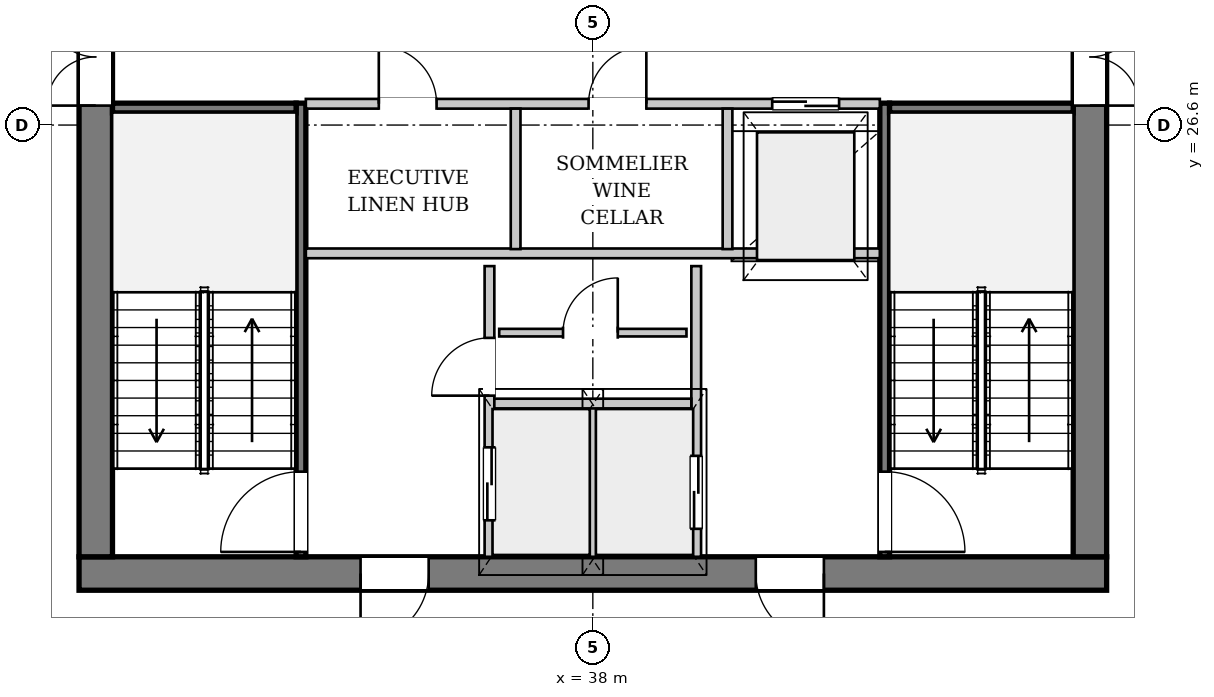
"""IFC4 building model, lengths in metres.
Left out: names, types, materials, properties, quantities, classifications, styles, units other than length and angle.
Written with IfcOpenShell. Run it as: python <this file> out.ifc"""

import sys

from ifc_helpers import new_model, si_unit, direction, frame, frame_2d, origin, place, context, subcontext, project, spatial, rectangle, extrude, source, transform, mapped, element, fill, save


model = new_model("IFC4")
c1 = context("Model", 3, precision=1e-05, world=origin(), true_north=direction((0.0, 1.0)))
c2 = subcontext(c1, "Body", "Model", "MODEL_VIEW")
j1 = project(units=[si_unit("LENGTHUNIT", "METRE"), si_unit("PLANEANGLEUNIT", "RADIAN")], contexts=[c1])
p1 = place(None, origin())
s1 = spatial("IfcSite", under=j1, at=p1, CompositionType="ELEMENT")
p2 = place(p1, origin())
s2 = spatial("IfcBuilding", under=s1, at=p2, CompositionType="ELEMENT")
p3 = place(p2, frame((0.0, 0.0, 160.8)))
s3 = spatial("IfcBuildingStorey", under=s2, at=p3, CompositionType="ELEMENT", Elevation=160.8)
p4 = place(p3, frame((52.91, 19.645, 0.0), z_axis=(0.0, 0.0, 1.0), x_axis=(-0.683193045934, -0.730237811941, 0.0)))
e1 = element("IfcWall", 1, at=p4, inside=s3, PredefinedType="SOLIDWALL", context=c2, shape_type="SweptSolid", body=[
    extrude(rectangle(XDim=23.503, YDim=0.32, at=frame_2d((11.752, 0.0))), origin(), (0.0, 0.0, 1.0), 2.722),
])
p5 = place(p4, frame((6.771, 0.0, 0.0)))
e2 = element("IfcOpeningElement", 2, at=p5, cuts=e1, PredefinedType="OPENING", context=c2, shape_type="SweptSolid", body=[
    extrude(rectangle(XDim=1.5, YDim=2.3, at=frame_2d((0.75, 1.15))), frame((0.0, 0.17, 0.0), z_axis=(0.0, -1.0, 0.0), x_axis=(1.0, 0.0, 0.0)), (0.0, 0.0, 1.0), 0.34),
])
p6 = place(p4, frame((16.093, 0.0, 0.252)))
e3 = element("IfcOpeningElement", 3, at=p6, cuts=e1, PredefinedType="OPENING", context=c2, shape_type="SweptSolid", body=[
    extrude(rectangle(XDim=2.6, YDim=2.35, at=frame_2d((1.3, 1.175))), frame((0.0, 0.17, 0.0), z_axis=(0.0, -1.0, 0.0), x_axis=(1.0, 0.0, 0.0)), (0.0, 0.0, 1.0), 0.34),
])
p7 = place(p3, frame((46.45, 19.225, 0.0), z_axis=(0.0, 0.0, 1.0), x_axis=(-1.0, 0.0, 0.0)))
e4 = element("IfcWall", 4, at=p7, inside=s3, PredefinedType="SHEAR", context=c2, shape_type="SweptSolid", body=[
    extrude(rectangle(XDim=16.9, YDim=0.55, at=frame_2d((8.45, 0.0))), origin(), (0.0, 0.0, 1.0), 3.33),
])
p8 = place(p7, frame((4.65, 0.0, 0.0)))
e5 = element("IfcOpeningElement", 5, at=p8, cuts=e4, PredefinedType="OPENING", context=c2, shape_type="SweptSolid", body=[
    extrude(rectangle(XDim=1.12, YDim=2.25, at=frame_2d((0.56, 1.125))), frame((0.0, 0.285, 0.0), z_axis=(0.0, -1.0, 0.0), x_axis=(1.0, 0.0, 0.0)), (0.0, 0.0, 1.0), 0.57),
])
p9 = place(p7, frame((11.15, 0.0, 0.0)))
e6 = element("IfcOpeningElement", 6, at=p9, cuts=e4, PredefinedType="OPENING", context=c2, shape_type="SweptSolid", body=[
    extrude(rectangle(XDim=1.12, YDim=2.25, at=frame_2d((0.56, 1.125))), frame((0.0, 0.285, 0.0), z_axis=(0.0, -1.0, 0.0), x_axis=(1.0, 0.0, 0.0)), (0.0, 0.0, 1.0), 0.57),
])
p10 = place(p3, frame((29.825, 19.5, 0.0), z_axis=(0.0, 0.0, 1.0), x_axis=(0.0, 1.0, 0.0)))
e7 = element("IfcWall", 7, at=p10, inside=s3, PredefinedType="SHEAR", context=c2, shape_type="SweptSolid", body=[
    extrude(rectangle(XDim=14.2, YDim=0.55, at=frame_2d((7.1, 0.0))), origin(), (0.0, 0.0, 1.0), 3.33),
])
p11 = place(p10, frame((7.42, 0.0, 0.0)))
e8 = element("IfcOpeningElement", 8, at=p11, cuts=e7, PredefinedType="OPENING", context=c2, shape_type="SweptSolid", body=[
    extrude(rectangle(XDim=1.6, YDim=2.2, at=frame_2d((0.8, 1.1))), frame((0.0, 0.285, 0.0), z_axis=(0.0, -1.0, 0.0), x_axis=(1.0, 0.0, 0.0)), (0.0, 0.0, 1.0), 0.57),
])
p12 = place(p3, frame((46.175, 33.7, 0.0), z_axis=(0.0, 0.0, 1.0), x_axis=(0.0, -1.0, 0.0)))
e9 = element("IfcWall", 9, at=p12, inside=s3, PredefinedType="SHEAR", context=c2, shape_type="SweptSolid", body=[
    extrude(rectangle(XDim=14.2, YDim=0.55, at=frame_2d((7.1, 0.0))), origin(), (0.0, 0.0, 1.0), 3.33),
])
p13 = place(p12, frame((5.18, 0.0, 0.0)))
e10 = element("IfcOpeningElement", 10, at=p13, cuts=e9, PredefinedType="OPENING", context=c2, shape_type="SweptSolid", body=[
    extrude(rectangle(XDim=1.6, YDim=2.2, at=frame_2d((0.8, 1.1))), frame((0.0, 0.285, 0.0), z_axis=(0.0, -1.0, 0.0), x_axis=(1.0, 0.0, 0.0)), (0.0, 0.0, 1.0), 0.57),
])
p14 = place(p12, frame((2.05, 0.0, 0.0)))
e11 = element("IfcOpeningElement", 11, at=p14, cuts=e9, PredefinedType="OPENING", context=c2, shape_type="SweptSolid", body=[
    extrude(rectangle(XDim=0.95, YDim=2.1, at=frame_2d((0.475, 1.05))), frame((0.0, 0.285, 0.0), z_axis=(0.0, -1.0, 0.0), x_axis=(1.0, 0.0, 0.0)), (0.0, 0.0, 1.0), 0.57),
])
p15 = place(p3, frame((33.2, 19.5, 0.0), z_axis=(0.0, 0.0, 1.0), x_axis=(0.0, 1.0, 0.0)))
e12 = element("IfcWall", 12, at=p15, inside=s3, PredefinedType="PARTITIONING", context=c2, shape_type="SweptSolid", body=[
    extrude(rectangle(XDim=7.46, YDim=0.16, at=frame_2d((3.73, 0.0))), origin(), (0.0, 0.0, 1.0), 3.33),
])
p16 = place(p15, frame((0.08, 0.0, 0.0)))
e13 = element("IfcOpeningElement", 13, at=p16, cuts=e12, PredefinedType="OPENING", context=c2, shape_type="SweptSolid", body=[
    extrude(rectangle(XDim=1.32, YDim=2.2, at=frame_2d((0.66, 1.1))), frame((0.0, 0.09, 0.0), z_axis=(0.0, -1.0, 0.0), x_axis=(1.0, 0.0, 0.0)), (0.0, 0.0, 1.0), 0.18),
])
p17 = place(p3, frame((30.1, 26.88, 0.0), z_axis=(0.0, 0.0, 1.0), x_axis=(1.0, 0.0, 0.0)))
e14 = element("IfcWall", 14, at=p17, inside=s3, PredefinedType="PARTITIONING", context=c2, shape_type="SweptSolid", body=[
    extrude(rectangle(XDim=3.02, YDim=0.16, at=frame_2d((1.51, 0.0))), origin(), (0.0, 0.0, 1.0), 3.33),
])
p18 = place(p3, frame((42.8, 26.96, 0.0), z_axis=(0.0, 0.0, 1.0), x_axis=(0.0, -1.0, 0.0)))
e15 = element("IfcWall", 15, at=p18, inside=s3, PredefinedType="PARTITIONING", context=c2, shape_type="SweptSolid", body=[
    extrude(rectangle(XDim=7.46, YDim=0.16, at=frame_2d((3.73, 0.0))), origin(), (0.0, 0.0, 1.0), 3.33),
])
p19 = place(p18, frame((6.06, 0.0, 0.0)))
e16 = element("IfcOpeningElement", 16, at=p19, cuts=e15, PredefinedType="OPENING", context=c2, shape_type="SweptSolid", body=[
    extrude(rectangle(XDim=1.32, YDim=2.2, at=frame_2d((0.66, 1.1))), frame((0.0, 0.09, 0.0), z_axis=(0.0, -1.0, 0.0), x_axis=(1.0, 0.0, 0.0)), (0.0, 0.0, 1.0), 0.18),
])
p20 = place(p3, frame((42.88, 26.88, 0.0), z_axis=(0.0, 0.0, 1.0), x_axis=(1.0, 0.0, 0.0)))
e17 = element("IfcWall", 17, at=p20, inside=s3, PredefinedType="PARTITIONING", context=c2, shape_type="SweptSolid", body=[
    extrude(rectangle(XDim=3.02, YDim=0.16, at=frame_2d((1.51, 0.0))), origin(), (0.0, 0.0, 1.0), 3.33),
])
p21 = place(p3, frame((36.3, 19.5, 0.0), z_axis=(0.0, 0.0, 1.0), x_axis=(0.0, 1.0, 0.0)))
e18 = element("IfcWall", 18, at=p21, inside=s3, PredefinedType="PARTITIONING", context=c2, shape_type="SweptSolid", body=[
    extrude(rectangle(XDim=4.78, YDim=0.16, at=frame_2d((2.39, 0.0))), origin(), (0.0, 0.0, 1.0), 3.33),
])
p22 = place(p21, frame((0.6, 0.0, 0.0)))
e19 = element("IfcOpeningElement", 19, at=p22, cuts=e18, PredefinedType="OPENING", context=c2, shape_type="SweptSolid", body=[
    extrude(rectangle(XDim=1.2, YDim=2.2, at=frame_2d((0.6, 1.1))), frame((0.0, 0.09, 0.0), z_axis=(0.0, -1.0, 0.0), x_axis=(1.0, 0.0, 0.0)), (0.0, 0.0, 1.0), 0.18),
])
p23 = place(p21, frame((2.65, 0.0, 0.0)))
e20 = element("IfcOpeningElement", 20, at=p23, cuts=e18, PredefinedType="OPENING", context=c2, shape_type="SweptSolid", body=[
    extrude(rectangle(XDim=0.95, YDim=2.1, at=frame_2d((0.475, 1.05))), frame((0.0, 0.09, 0.0), z_axis=(0.0, -1.0, 0.0), x_axis=(1.0, 0.0, 0.0)), (0.0, 0.0, 1.0), 0.18),
])
p24 = place(p3, frame((39.7, 24.28, 0.0), z_axis=(0.0, 0.0, 1.0), x_axis=(0.0, -1.0, 0.0)))
e21 = element("IfcWall", 21, at=p24, inside=s3, PredefinedType="PARTITIONING", context=c2, shape_type="SweptSolid", body=[
    extrude(rectangle(XDim=4.78, YDim=0.16, at=frame_2d((2.39, 0.0))), origin(), (0.0, 0.0, 1.0), 3.33),
])
p25 = place(p24, frame((3.12, 0.0, 0.0)))
e22 = element("IfcOpeningElement", 22, at=p25, cuts=e21, PredefinedType="OPENING", context=c2, shape_type="SweptSolid", body=[
    extrude(rectangle(XDim=1.2, YDim=2.2, at=frame_2d((0.6, 1.1))), frame((0.0, 0.09, 0.0), z_axis=(0.0, -1.0, 0.0), x_axis=(1.0, 0.0, 0.0)), (0.0, 0.0, 1.0), 0.18),
])
p26 = place(p3, frame((38.0, 19.5, 0.0), z_axis=(0.0, 0.0, 1.0), x_axis=(0.0, 1.0, 0.0)))
e23 = element("IfcWall", 23, at=p26, inside=s3, PredefinedType="PARTITIONING", context=c2, shape_type="SweptSolid", body=[
    extrude(rectangle(XDim=2.46, YDim=0.125, at=frame_2d((1.23, 0.0))), origin(), (0.0, 0.0, 1.0), 3.33),
])
p27 = place(p3, frame((36.38, 22.02, 0.0), z_axis=(0.0, 0.0, 1.0), x_axis=(1.0, 0.0, 0.0)))
e24 = element("IfcWall", 24, at=p27, inside=s3, PredefinedType="PARTITIONING", context=c2, shape_type="SweptSolid", body=[
    extrude(rectangle(XDim=3.24, YDim=0.16, at=frame_2d((1.62, 0.0))), origin(), (0.0, 0.0, 1.0), 3.33),
])
p28 = place(p3, frame((33.28, 24.49, 0.0), z_axis=(0.0, 0.0, 1.0), x_axis=(1.0, 0.0, 0.0)))
e25 = element("IfcWall", 25, at=p28, inside=s3, PredefinedType="PARTITIONING", context=c2, shape_type="SweptSolid", body=[
    extrude(rectangle(XDim=9.44, YDim=0.16, at=frame_2d((4.72, 0.0))), origin(), (0.0, 0.0, 1.0), 3.33),
])
p29 = place(p3, frame((36.46, 23.186, 0.0), z_axis=(0.0, 0.0, 1.0), x_axis=(1.0, 0.0, 0.0)))
e26 = element("IfcWall", 26, at=p29, inside=s3, PredefinedType="PARTITIONING", context=c2, shape_type="SweptSolid", body=[
    extrude(rectangle(XDim=3.08, YDim=0.125, at=frame_2d((1.54, 0.0))), origin(), (0.0, 0.0, 1.0), 3.33),
])
p30 = place(p29, frame((1.05, 0.0, 0.0)))
e27 = element("IfcOpeningElement", 27, at=p30, cuts=e26, PredefinedType="OPENING", context=c2, shape_type="SweptSolid", body=[
    extrude(rectangle(XDim=0.9, YDim=2.1, at=frame_2d((0.45, 1.05))), frame((0.0, 0.073, 0.0), z_axis=(0.0, -1.0, 0.0), x_axis=(1.0, 0.0, 0.0)), (0.0, 0.0, 1.0), 0.145),
])
p31 = place(p3, frame((33.28, 26.95, 0.0), z_axis=(0.0, 0.0, 1.0), x_axis=(1.0, 0.0, 0.0)))
e28 = element("IfcWall", 28, at=p31, inside=s3, PredefinedType="PARTITIONING", context=c2, shape_type="SweptSolid", body=[
    extrude(rectangle(XDim=9.44, YDim=0.16, at=frame_2d((4.72, 0.0))), origin(), (0.0, 0.0, 1.0), 3.33),
])
p32 = place(p31, frame((1.2, 0.0, 0.0)))
e29 = element("IfcOpeningElement", 29, at=p32, cuts=e28, PredefinedType="OPENING", context=c2, shape_type="SweptSolid", body=[
    extrude(rectangle(XDim=0.95, YDim=2.1, at=frame_2d((0.475, 1.05))), frame((0.0, 0.09, 0.0), z_axis=(0.0, -1.0, 0.0), x_axis=(1.0, 0.0, 0.0)), (0.0, 0.0, 1.0), 0.18),
])
p33 = place(p31, frame((4.65, 0.0, 0.0)))
e30 = element("IfcOpeningElement", 30, at=p33, cuts=e28, PredefinedType="OPENING", context=c2, shape_type="SweptSolid", body=[
    extrude(rectangle(XDim=0.95, YDim=2.1, at=frame_2d((0.475, 1.05))), frame((0.0, 0.09, 0.0), z_axis=(0.0, -1.0, 0.0), x_axis=(1.0, 0.0, 0.0)), (0.0, 0.0, 1.0), 0.18),
])
p34 = place(p31, frame((7.67, 0.0, 0.0)))
e31 = element("IfcOpeningElement", 31, at=p34, cuts=e28, PredefinedType="OPENING", context=c2, shape_type="SweptSolid", body=[
    extrude(rectangle(XDim=1.1, YDim=2.2, at=frame_2d((0.55, 1.1))), frame((0.0, 0.09, 0.0), z_axis=(0.0, -1.0, 0.0), x_axis=(1.0, 0.0, 0.0)), (0.0, 0.0, 1.0), 0.18),
])
for number, where, z_axis, x_axis in (
    (32, (36.73, 24.56, 0.0), (0.0, 0.0, 1.0), (0.0, 1.0, 0.0)),
    (33, (40.215, 24.56, 0.0), (0.0, 0.0, 1.0), (0.0, 1.0, 0.0)),
):
    element("IfcWall", number, at=place(p3, frame(where, z_axis=z_axis, x_axis=x_axis)), inside=s3, PredefinedType="PARTITIONING", context=c2, shape_type="SweptSolid", body=[
        extrude(rectangle(XDim=2.31, YDim=0.16, at=frame_2d((1.155, 0.0))), origin(), (0.0, 0.0, 1.0), 3.33),
    ])
m1 = source(origin(), c2, "Body", "SweptSolid", [
    extrude(rectangle(XDim=1.12, YDim=2.25, at=frame_2d((0.56, 1.125))), frame((0.0, 0.025, 0.0), z_axis=(0.0, -1.0, 0.0), x_axis=(1.0, 0.0, 0.0)), (0.0, 0.0, 1.0), 0.05),
])
p35 = place(p8, origin())
e34 = element("IfcDoor", 34, at=p35, inside=s3, OperationType="SINGLE_SWING_LEFT", PredefinedType="DOOR", context=c2, shape_type="MappedRepresentation", body=[
    mapped(m1, transform((0.0, 0.0, 0.0), x_axis=(1.0, 0.0, 0.0), y_axis=(0.0, 1.0, 0.0), z_axis=(0.0, 0.0, 1.0), scale=1.0)),
])
fill(e5, e34)
p36 = place(p9, origin())
e35 = element("IfcDoor", 35, at=p36, inside=s3, OperationType="SINGLE_SWING_RIGHT", PredefinedType="DOOR", context=c2, shape_type="MappedRepresentation", body=[
    mapped(m1, transform((0.0, 0.0, 0.0), x_axis=(1.0, 0.0, 0.0), y_axis=(0.0, 1.0, 0.0), z_axis=(0.0, 0.0, 1.0), scale=1.0)),
])
fill(e6, e35)
m2 = source(origin(), c2, "Body", "SweptSolid", [
    extrude(rectangle(XDim=1.6, YDim=2.2, at=frame_2d((0.8, 1.1))), frame((0.0, 0.025, 0.0), z_axis=(0.0, -1.0, 0.0), x_axis=(1.0, 0.0, 0.0)), (0.0, 0.0, 1.0), 0.05),
])
p37 = place(p11, origin())
e36 = element("IfcDoor", 36, at=p37, inside=s3, OperationType="DOUBLE_DOOR_SINGLE_SWING", PredefinedType="DOOR", context=c2, shape_type="MappedRepresentation", body=[
    mapped(m2, transform((0.0, 0.0, 0.0), x_axis=(1.0, 0.0, 0.0), y_axis=(0.0, 1.0, 0.0), z_axis=(0.0, 0.0, 1.0), scale=1.0)),
])
fill(e8, e36)
p38 = place(p13, origin())
e37 = element("IfcDoor", 37, at=p38, inside=s3, OperationType="DOUBLE_DOOR_SINGLE_SWING", PredefinedType="DOOR", context=c2, shape_type="MappedRepresentation", body=[
    mapped(m2, transform((0.0, 0.0, 0.0), x_axis=(1.0, 0.0, 0.0), y_axis=(0.0, 1.0, 0.0), z_axis=(0.0, 0.0, 1.0), scale=1.0)),
])
fill(e10, e37)
m3 = source(origin(), c2, "Body", "SweptSolid", [
    extrude(rectangle(XDim=1.32, YDim=2.2, at=frame_2d((0.66, 1.1))), frame((0.0, 0.025, 0.0), z_axis=(0.0, -1.0, 0.0), x_axis=(1.0, 0.0, 0.0)), (0.0, 0.0, 1.0), 0.05),
])
p39 = place(p16, origin())
e38 = element("IfcDoor", 38, at=p39, inside=s3, OperationType="SINGLE_SWING_LEFT", PredefinedType="DOOR", context=c2, shape_type="MappedRepresentation", body=[
    mapped(m3, transform((0.0, 0.0, 0.0), x_axis=(1.0, 0.0, 0.0), y_axis=(0.0, 1.0, 0.0), z_axis=(0.0, 0.0, 1.0), scale=1.0)),
])
fill(e13, e38)
p40 = place(p19, origin())
e39 = element("IfcDoor", 39, at=p40, inside=s3, OperationType="SINGLE_SWING_RIGHT", PredefinedType="DOOR", context=c2, shape_type="MappedRepresentation", body=[
    mapped(m3, transform((0.0, 0.0, 0.0), x_axis=(1.0, 0.0, 0.0), y_axis=(0.0, 1.0, 0.0), z_axis=(0.0, 0.0, 1.0), scale=1.0)),
])
fill(e16, e39)
m4 = source(origin(), c2, "Body", "SweptSolid", [
    extrude(rectangle(XDim=1.2, YDim=2.2, at=frame_2d((0.6, 1.1))), frame((0.0, 0.025, 0.0), z_axis=(0.0, -1.0, 0.0), x_axis=(1.0, 0.0, 0.0)), (0.0, 0.0, 1.0), 0.05),
])
p41 = place(p22, origin())
e40 = element("IfcDoor", 40, at=p41, inside=s3, OperationType="DOUBLE_DOOR_SLIDING", PredefinedType="DOOR", context=c2, shape_type="MappedRepresentation", body=[
    mapped(m4, transform((0.0, 0.0, 0.0), x_axis=(1.0, 0.0, 0.0), y_axis=(0.0, 1.0, 0.0), z_axis=(0.0, 0.0, 1.0), scale=1.0)),
])
fill(e19, e40)
m5 = source(origin(), c2, "Body", "SweptSolid", [
    extrude(rectangle(XDim=0.95, YDim=2.1, at=frame_2d((0.475, 1.05))), frame((0.0, 0.025, 0.0), z_axis=(0.0, -1.0, 0.0), x_axis=(1.0, 0.0, 0.0)), (0.0, 0.0, 1.0), 0.05),
])
p42 = place(p23, origin())
e41 = element("IfcDoor", 41, at=p42, inside=s3, OperationType="SINGLE_SWING_LEFT", PredefinedType="DOOR", context=c2, shape_type="MappedRepresentation", body=[
    mapped(m5, transform((0.0, 0.0, 0.0), x_axis=(1.0, 0.0, 0.0), y_axis=(0.0, 1.0, 0.0), z_axis=(0.0, 0.0, 1.0), scale=1.0)),
])
fill(e20, e41)
m6 = source(origin(), c2, "Body", "SweptSolid", [
    extrude(rectangle(XDim=0.9, YDim=2.1, at=frame_2d((0.45, 1.05))), frame((0.0, 0.025, 0.0), z_axis=(0.0, -1.0, 0.0), x_axis=(1.0, 0.0, 0.0)), (0.0, 0.0, 1.0), 0.05),
])
p43 = place(p30, origin())
e42 = element("IfcDoor", 42, at=p43, inside=s3, OperationType="SINGLE_SWING_RIGHT", PredefinedType="DOOR", context=c2, shape_type="MappedRepresentation", body=[
    mapped(m6, transform((0.0, 0.0, 0.0), x_axis=(1.0, 0.0, 0.0), y_axis=(0.0, 1.0, 0.0), z_axis=(0.0, 0.0, 1.0), scale=1.0)),
])
fill(e27, e42)
p44 = place(p25, origin())
e43 = element("IfcDoor", 43, at=p44, inside=s3, OperationType="DOUBLE_DOOR_SLIDING", PredefinedType="DOOR", context=c2, shape_type="MappedRepresentation", body=[
    mapped(m4, transform((0.0, 0.0, 0.0), x_axis=(1.0, 0.0, 0.0), y_axis=(0.0, 1.0, 0.0), z_axis=(0.0, 0.0, 1.0), scale=1.0)),
])
fill(e22, e43)
p45 = place(p32, origin())
e44 = element("IfcDoor", 44, at=p45, inside=s3, OperationType="SINGLE_SWING_LEFT", PredefinedType="DOOR", context=c2, shape_type="MappedRepresentation", body=[
    mapped(m5, transform((0.0, 0.0, 0.0), x_axis=(1.0, 0.0, 0.0), y_axis=(0.0, 1.0, 0.0), z_axis=(0.0, 0.0, 1.0), scale=1.0)),
])
fill(e29, e44)
p46 = place(p33, origin())
e45 = element("IfcDoor", 45, at=p46, inside=s3, OperationType="SINGLE_SWING_RIGHT", PredefinedType="DOOR", context=c2, shape_type="MappedRepresentation", body=[
    mapped(m5, transform((0.0, 0.0, 0.0), x_axis=(1.0, 0.0, 0.0), y_axis=(0.0, 1.0, 0.0), z_axis=(0.0, 0.0, 1.0), scale=1.0)),
])
fill(e30, e45)
m7 = source(origin(), c2, "Body", "SweptSolid", [
    extrude(rectangle(XDim=1.1, YDim=2.2, at=frame_2d((0.55, 1.1))), frame((0.0, 0.025, 0.0), z_axis=(0.0, -1.0, 0.0), x_axis=(1.0, 0.0, 0.0)), (0.0, 0.0, 1.0), 0.05),
])
p47 = place(p34, origin())
e46 = element("IfcDoor", 46, at=p47, inside=s3, OperationType="DOUBLE_DOOR_SLIDING", PredefinedType="DOOR", context=c2, shape_type="MappedRepresentation", body=[
    mapped(m7, transform((0.0, 0.0, 0.0), x_axis=(1.0, 0.0, 0.0), y_axis=(0.0, 1.0, 0.0), z_axis=(0.0, 0.0, 1.0), scale=1.0)),
])
fill(e31, e46)
save(model, sys.argv[1])
